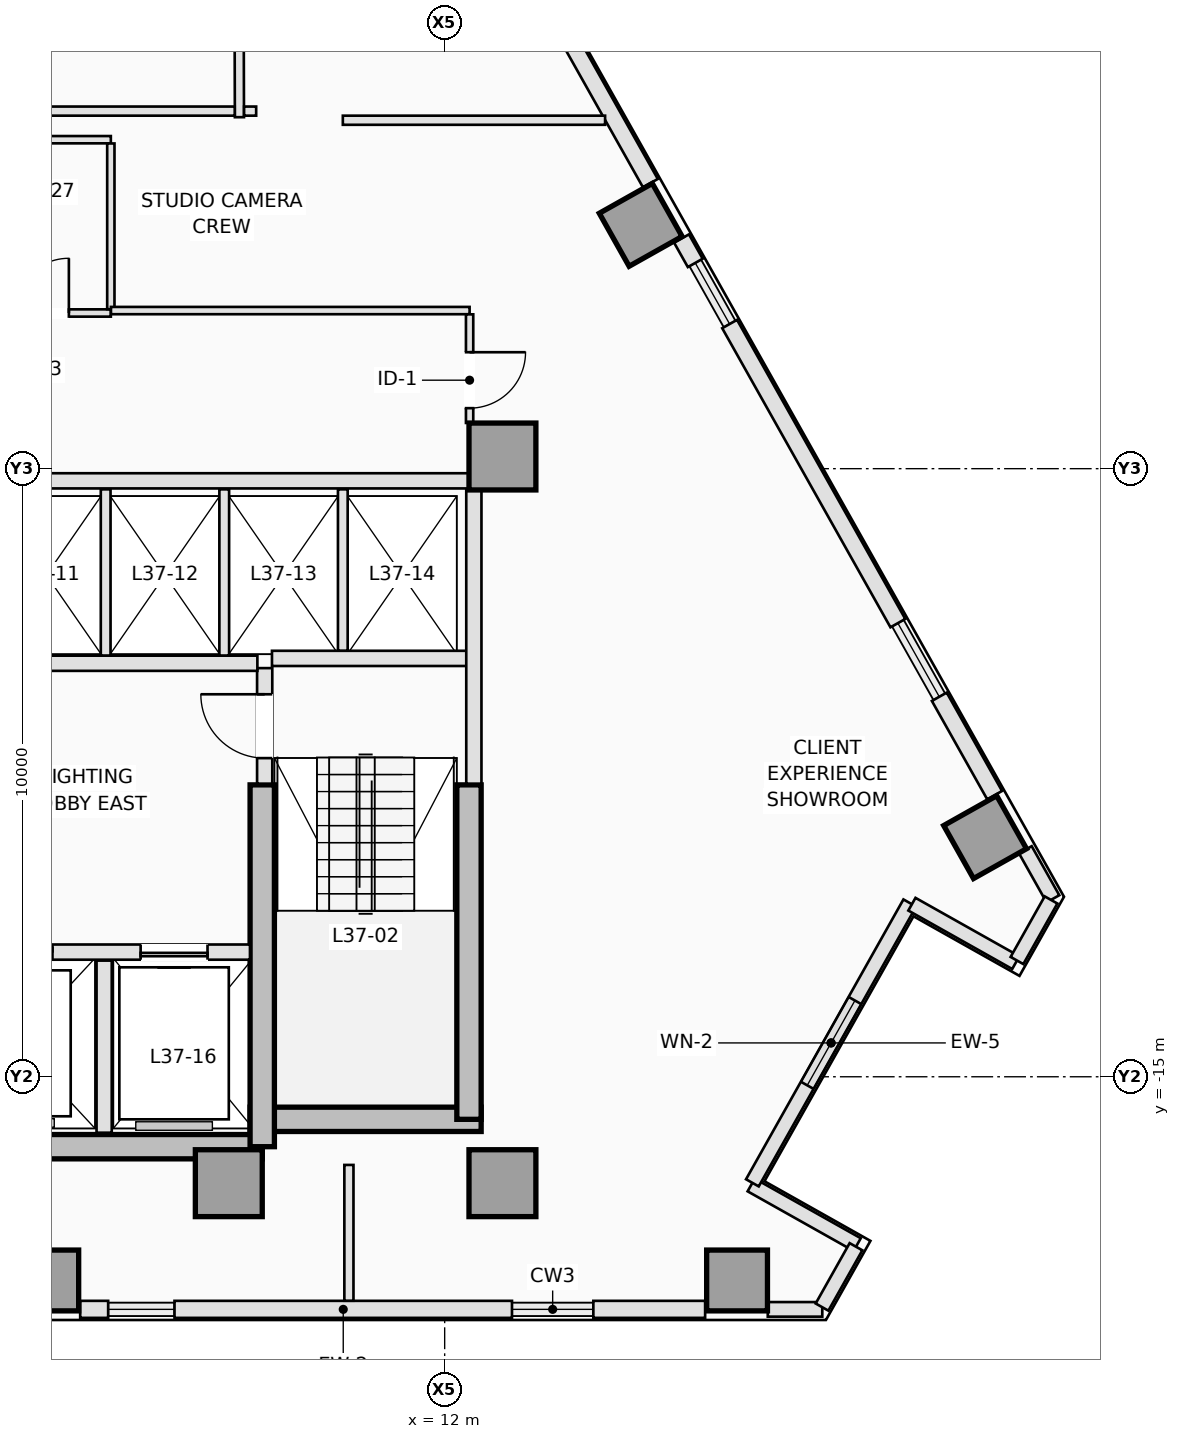
"""IFC4 building model, lengths in metres.
Left out: names, types, materials, properties, quantities, classifications, styles, units other than length and angle.
Written with IfcOpenShell. Run it as: python <this file> out.ifc"""

import sys

from ifc_helpers import new_model, si_unit, direction, frame, frame_2d, origin, origin_2d, place, context, subcontext, project, spatial, rectangle, extrude, element, fill, save


model = new_model("IFC4")
c1 = context("Model", 3, precision=1e-05, world=origin(), true_north=direction((0.0, 1.0)))
c2 = subcontext(c1, "Body", "Model", "MODEL_VIEW")
j1 = project(units=[si_unit("LENGTHUNIT", "METRE"), si_unit("PLANEANGLEUNIT", "RADIAN")], contexts=[c1])
p1 = place(None, origin())
s1 = spatial("IfcSite", under=j1, at=p1, CompositionType="ELEMENT")
p2 = place(p1, origin())
s2 = spatial("IfcBuilding", under=s1, at=p2, CompositionType="ELEMENT")
p3 = place(p2, frame((0.0, 0.0, 137.0)))
s3 = spatial("IfcBuildingStorey", under=s2, at=p3, CompositionType="ELEMENT", Elevation=137.0)
p4 = place(p3, frame((3.75, -16.15, 0.0), z_axis=(0.0, 0.0, 1.0), x_axis=(1.0, 0.0, 0.0)))
e1 = element("IfcWall", 1, at=p4, inside=s3, PredefinedType="SHEAR", context=c2, shape_type="SweptSolid", body=[
    extrude(rectangle(XDim=5.25, YDim=0.4, at=frame_2d((2.625, 0.0))), origin(), (0.0, 0.0, 1.0), 3.5),
])
p5 = place(p3, frame((8.8, -15.7, 0.0), z_axis=(0.0, 0.0, 1.0), x_axis=(1.0, 0.0, 0.0)))
e2 = element("IfcWall", 2, at=p5, inside=s3, PredefinedType="SHEAR", context=c2, shape_type="SweptSolid", body=[
    extrude(rectangle(XDim=3.8, YDim=0.4, at=frame_2d((1.9, 0.0))), origin(), (0.0, 0.0, 1.0), 3.5),
])
p6 = place(p3, frame((12.4, -15.7, 0.0), z_axis=(0.0, 0.0, 1.0), x_axis=(0.0, 1.0, 0.0)))
e3 = element("IfcWall", 3, at=p6, inside=s3, PredefinedType="SHEAR", context=c2, shape_type="SweptSolid", body=[
    extrude(rectangle(XDim=5.5, YDim=0.4, at=frame_2d((2.75, 0.0))), origin(), (0.0, 0.0, 1.0), 3.5),
])
p7 = place(p3, frame((9.0, -16.15, 0.0), z_axis=(0.0, 0.0, 1.0), x_axis=(0.0, 1.0, 0.0)))
e4 = element("IfcWall", 4, at=p7, inside=s3, PredefinedType="SHEAR", context=c2, shape_type="SweptSolid", body=[
    extrude(rectangle(XDim=5.95, YDim=0.4, at=frame_2d((2.975, 0.0))), origin(), (0.0, 0.0, 1.0), 3.5),
])
for number, where, z_axis, x_axis in (
    (5, (8.45, -16.75, 0.0), (0.0, 0.0, 1.0), (1.0, 0.0, 0.0)),
    (6, (12.95, -16.75, 0.0), (0.0, 0.0, 1.0), (1.0, 0.0, 0.0)),
    (7, (12.95, -4.8, 0.0), (0.0, 0.0, 1.0), (1.0, 0.0, 0.0)),
):
    element("IfcColumn", number, at=place(p3, frame(where, z_axis=z_axis, x_axis=x_axis)), inside=s3, PredefinedType="COLUMN", context=c2, shape_type="SweptSolid", body=[
        extrude(rectangle(XDim=1.1, YDim=1.1, at=origin_2d()), origin(), (0.0, 0.0, 1.0), 3.5),
    ])
for number, where, z_axis, x_axis in (
    (8, (5.481, -18.35, 0.0), (0.0, 0.0, 1.0), (0.0, 1.0, 0.0)),
    (9, (16.808, -18.35, 0.0), (0.0, 0.0, 1.0), (0.0, 1.0, 0.0)),
    (10, (20.888, -11.06, 0.0), (0.0, 0.0, 1.0), (0.872, 0.49, 0.0)),
    (11, (15.224, -0.991, 0.0), (0.0, 0.0, 1.0), (0.872, 0.49, 0.0)),
):
    element("IfcColumn", number, at=place(p3, frame(where, z_axis=z_axis, x_axis=x_axis)), inside=s3, PredefinedType="COLUMN", context=c2, shape_type="SweptSolid", body=[
        extrude(rectangle(XDim=1.0, YDim=1.0, at=origin_2d()), origin(), (0.0, 0.0, 1.0), 3.5),
    ])
p8 = place(p3, frame((18.21, -18.825, 0.0), z_axis=(0.0, 0.0, 1.0), x_axis=(-1.0, 0.0, 0.0)))
e12 = element("IfcWall", 12, at=p8, inside=s3, PredefinedType="STANDARD", context=c2, shape_type="SweptSolid", body=[
    extrude(rectangle(XDim=0.896, YDim=0.24, at=frame_2d((0.448, 0.0))), origin(), (0.0, 0.0, 1.0), 3.25),
])
p9 = place(p3, frame((16.283, -18.825, 0.0), z_axis=(0.0, 0.0, 1.0), x_axis=(-1.0, 0.0, 0.0)))
e13 = element("IfcWall", 13, at=p9, inside=s3, PredefinedType="STANDARD", context=c2, shape_type="SweptSolid", body=[
    extrude(rectangle(XDim=1.838, YDim=0.28, at=frame_2d((0.919, 0.0))), origin(), (0.0, 0.0, 1.0), 3.25),
])
p10 = place(p3, frame((13.107, -18.825, 0.0), z_axis=(0.0, 0.0, 1.0), x_axis=(-1.0, 0.0, 0.0)))
e14 = element("IfcWall", 14, at=p10, inside=s3, PredefinedType="STANDARD", context=c2, shape_type="SweptSolid", body=[
    extrude(rectangle(XDim=5.55, YDim=0.28, at=frame_2d((2.775, 0.0))), origin(), (0.0, 0.0, 1.0), 3.25),
])
p11 = place(p3, frame((6.466, -18.825, 0.0), z_axis=(0.0, 0.0, 1.0), x_axis=(-1.0, 0.0, 0.0)))
e15 = element("IfcWall", 15, at=p11, inside=s3, PredefinedType="STANDARD", context=c2, shape_type="SweptSolid", body=[
    extrude(rectangle(XDim=0.46, YDim=0.28, at=frame_2d((0.23, 0.0))), origin(), (0.0, 0.0, 1.0), 3.25),
])
p12 = place(p3, frame((21.549, -11.267, 0.0), z_axis=(0.0, 0.0, 1.0), x_axis=(0.490248718924, -0.871582579905, 0.0)))
e16 = element("IfcWall", 16, at=p12, inside=s3, PredefinedType="STANDARD", context=c2, shape_type="SweptSolid", body=[
    extrude(rectangle(XDim=0.926, YDim=0.24, at=frame_2d((0.463, 0.0))), origin(), (0.0, 0.0, 1.0), 3.25),
])
p13 = place(p3, frame((15.896, -1.215, 0.0), z_axis=(0.0, 0.0, 1.0), x_axis=(0.490009165718, -0.871717280724, 0.0)))
e17 = element("IfcWall", 17, at=p13, inside=s3, PredefinedType="STANDARD", context=c2, shape_type="SweptSolid", body=[
    extrude(rectangle(XDim=0.46, YDim=0.28, at=frame_2d((0.23, 0.0))), origin(), (0.0, 0.0, 1.0), 3.25),
])
p14 = place(p3, frame((16.686, -2.621, 0.0), z_axis=(0.0, 0.0, 1.0), x_axis=(0.490238645956, -0.871588245682, 0.0)))
e18 = element("IfcWall", 18, at=p14, inside=s3, PredefinedType="STANDARD", context=c2, shape_type="SweptSolid", body=[
    extrude(rectangle(XDim=5.643, YDim=0.28, at=frame_2d((2.822, 0.0))), origin(), (0.0, 0.0, 1.0), 3.25),
])
p15 = place(p3, frame((20.134, -8.751, 0.0), z_axis=(0.0, 0.0, 1.0), x_axis=(0.490248749158, -0.871582562899, 0.0)))
e19 = element("IfcWall", 19, at=p15, inside=s3, PredefinedType="STANDARD", context=c2, shape_type="SweptSolid", body=[
    extrude(rectangle(XDim=1.856, YDim=0.28, at=frame_2d((0.928, 0.0))), origin(), (0.0, 0.0, 1.0), 3.25),
])
p16 = place(p3, frame((13.238, 3.509, 0.0), z_axis=(0.0, 0.0, 1.0), x_axis=(0.490232095789, -0.871591929895, 0.0)))
e20 = element("IfcWall", 20, at=p16, inside=s3, PredefinedType="STANDARD", context=c2, shape_type="SweptSolid", body=[
    extrude(rectangle(XDim=4.375, YDim=0.28, at=frame_2d((2.188, 0.0))), origin(), (0.0, 0.0, 1.0), 3.25),
])
p17 = place(p3, frame((18.784, -17.76, 0.0), z_axis=(0.0, 0.0, 1.0), x_axis=(-0.871536415941, 0.49033078191, 0.0)))
e21 = element("IfcWall", 21, at=p17, inside=s3, PredefinedType="STANDARD", context=c2, shape_type="SweptSolid", body=[
    extrude(rectangle(XDim=2.0, YDim=0.24, at=frame_2d((1.0, 0.0))), origin(), (0.0, 0.0, 1.0), 3.25),
])
p18 = place(p3, frame((17.06, -16.744, 0.0), z_axis=(0.0, 0.0, 1.0), x_axis=(0.490276606961, 0.871566892824, 0.0)))
e22 = element("IfcWall", 22, at=p18, inside=s3, PredefinedType="STANDARD", context=c2, shape_type="SweptSolid", body=[
    extrude(rectangle(XDim=5.28, YDim=0.24, at=frame_2d((2.64, 0.0))), origin(), (0.0, 0.0, 1.0), 3.25),
])
p19 = place(p18, frame((1.84, 0.0, 0.9)))
e23 = element("IfcOpeningElement", 23, at=p19, cuts=e22, PredefinedType="OPENING", context=c2, shape_type="SweptSolid", body=[
    extrude(rectangle(XDim=1.6, YDim=2.1, at=frame_2d((0.8, 1.05))), frame((0.0, 0.13, 0.0), z_axis=(0.0, -1.0, 0.0), x_axis=(1.0, 0.0, 0.0)), (0.0, 0.0, 1.0), 0.26),
])
p20 = place(p3, frame((19.684, -12.162, 0.0), z_axis=(0.0, 0.0, 1.0), x_axis=(0.871512328312, -0.490373593906, 0.0)))
e24 = element("IfcWall", 24, at=p20, inside=s3, PredefinedType="STANDARD", context=c2, shape_type="SweptSolid", body=[
    extrude(rectangle(XDim=1.96, YDim=0.24, at=frame_2d((0.98, 0.0))), origin(), (0.0, 0.0, 1.0), 3.25),
])
p21 = place(p3, frame((21.412, -13.088, 0.0), z_axis=(0.0, 0.0, 1.0), x_axis=(0.4900989379, 0.871666811958, 0.0)))
e25 = element("IfcWall", 25, at=p21, inside=s3, PredefinedType="STANDARD", context=c2, shape_type="SweptSolid", body=[
    extrude(rectangle(XDim=1.143, YDim=0.24, at=frame_2d((0.571, 0.0))), origin(), (0.0, 0.0, 1.0), 3.25),
])
p22 = place(p3, frame((18.206, -18.788, 0.0), z_axis=(0.0, 0.0, 1.0), x_axis=(0.490403700594, 0.871495387506, 0.0)))
e26 = element("IfcWall", 26, at=p22, inside=s3, PredefinedType="STANDARD", context=c2, shape_type="SweptSolid", body=[
    extrude(rectangle(XDim=1.139, YDim=0.24, at=frame_2d((0.57, 0.0))), origin(), (0.0, 0.0, 1.0), 3.25),
])
p23 = place(p3, frame((9.04, -10.18, 0.0), z_axis=(0.0, 0.0, 1.0), x_axis=(0.0, 1.0, 0.0)))
e27 = element("IfcWall", 27, at=p23, inside=s3, PredefinedType="PARTITIONING", context=c2, shape_type="SweptSolid", body=[
    extrude(rectangle(XDim=1.9, YDim=0.25, at=frame_2d((0.95, 0.0))), origin(), (0.0, 0.0, 1.0), 3.25),
])
p24 = place(p23, frame((0.42, 0.0, 0.0)))
e28 = element("IfcOpeningElement", 28, at=p24, cuts=e27, PredefinedType="OPENING", context=c2, shape_type="SweptSolid", body=[
    extrude(rectangle(XDim=1.05, YDim=2.15, at=frame_2d((0.525, 1.075))), frame((0.0, 0.135, 0.0), z_axis=(0.0, -1.0, 0.0), x_axis=(1.0, 0.0, 0.0)), (0.0, 0.0, 1.0), 0.27),
])
p25 = place(p3, frame((9.16, -8.12, 0.0), z_axis=(0.0, 0.0, 1.0), x_axis=(1.0, 0.0, 0.0)))
e29 = element("IfcWall", 29, at=p25, inside=s3, PredefinedType="PARTITIONING", context=c2, shape_type="SweptSolid", body=[
    extrude(rectangle(XDim=3.22, YDim=0.25, at=frame_2d((1.61, 0.0))), origin(), (0.0, 0.0, 1.0), 3.25),
])
p26 = place(p3, frame((12.48, -10.18, 0.0), z_axis=(0.0, 0.0, 1.0), x_axis=(0.0, 1.0, 0.0)))
e30 = element("IfcWall", 30, at=p26, inside=s3, PredefinedType="PARTITIONING", context=c2, shape_type="SweptSolid", body=[
    extrude(rectangle(XDim=4.828, YDim=0.25, at=frame_2d((2.414, 0.0))), origin(), (0.0, 0.0, 1.0), 3.25),
])
p27 = place(p3, frame((3.68, -12.95, 0.0), z_axis=(0.0, 0.0, 1.0), x_axis=(1.0, 0.0, 0.0)))
e31 = element("IfcWall", 31, at=p27, inside=s3, PredefinedType="PARTITIONING", context=c2, shape_type="SweptSolid", body=[
    extrude(rectangle(XDim=5.118, YDim=0.25, at=frame_2d((2.559, 0.0))), origin(), (0.0, 0.0, 1.0), 3.25),
])
p28 = place(p27, frame((3.32, 0.0, 0.0)))
e32 = element("IfcOpeningElement", 32, at=p28, cuts=e31, PredefinedType="OPENING", context=c2, shape_type="SweptSolid", body=[
    extrude(rectangle(XDim=1.1, YDim=2.15, at=frame_2d((0.55, 1.075))), frame((0.0, 0.135, 0.0), z_axis=(0.0, -1.0, 0.0), x_axis=(1.0, 0.0, 0.0)), (0.0, 0.0, 1.0), 0.27),
])
p29 = place(p27, frame((0.67, 0.0, 0.0)))
e33 = element("IfcOpeningElement", 33, at=p29, cuts=e31, PredefinedType="OPENING", context=c2, shape_type="SweptSolid", body=[
    extrude(rectangle(XDim=1.2, YDim=2.15, at=frame_2d((0.6, 1.075))), frame((0.0, 0.135, 0.0), z_axis=(0.0, -1.0, 0.0), x_axis=(1.0, 0.0, 0.0)), (0.0, 0.0, 1.0), 0.27),
])
p30 = place(p3, frame((6.4, -15.92, 0.0), z_axis=(0.0, 0.0, 1.0), x_axis=(0.0, 1.0, 0.0)))
e34 = element("IfcWall", 34, at=p30, inside=s3, PredefinedType="PARTITIONING", context=c2, shape_type="SweptSolid", body=[
    extrude(rectangle(XDim=2.83, YDim=0.25, at=frame_2d((1.415, 0.0))), origin(), (0.0, 0.0, 1.0), 3.25),
])
p31 = place(p3, frame((3.68, -8.2, 0.0), z_axis=(0.0, 0.0, 1.0), x_axis=(1.0, 0.0, 0.0)))
e35 = element("IfcWall", 35, at=p31, inside=s3, PredefinedType="PARTITIONING", context=c2, shape_type="SweptSolid", body=[
    extrude(rectangle(XDim=5.24, YDim=0.25, at=frame_2d((2.62, 0.0))), origin(), (0.0, 0.0, 1.0), 3.25),
])
p32 = place(p3, frame((4.302, -5.2, 0.0), z_axis=(0.0, 0.0, 1.0), x_axis=(1.0, 0.0, 0.0)))
e36 = element("IfcWall", 36, at=p32, inside=s3, PredefinedType="PARTITIONING", context=c2, shape_type="SweptSolid", body=[
    extrude(rectangle(XDim=8.096, YDim=0.25, at=frame_2d((4.048, 0.0))), origin(), (0.0, 0.0, 1.0), 3.25),
])
for number, where, z_axis, x_axis in (
    (37, (6.425, -8.073, 0.0), (0.0, 0.0, 1.0), (0.0, 1.0, 0.0)),
    (38, (8.375, -8.073, 0.0), (0.0, 0.0, 1.0), (0.0, 1.0, 0.0)),
):
    element("IfcWall", number, at=place(p3, frame(where, z_axis=z_axis, x_axis=x_axis)), inside=s3, PredefinedType="PARTITIONING", context=c2, shape_type="SweptSolid", body=[
        extrude(rectangle(XDim=2.733, YDim=0.16, at=frame_2d((1.366, 0.0))), origin(), (0.0, 0.0, 1.0), 3.25),
    ])
p33 = place(p3, frame((10.325, -7.993, 0.0), z_axis=(0.0, 0.0, 1.0), x_axis=(0.0, 1.0, 0.0)))
e39 = element("IfcWall", 39, at=p33, inside=s3, PredefinedType="PARTITIONING", context=c2, shape_type="SweptSolid", body=[
    extrude(rectangle(XDim=2.653, YDim=0.16, at=frame_2d((1.326, 0.0))), origin(), (0.0, 0.0, 1.0), 3.25),
])
p34 = place(p3, frame((1.94, -2.44, 0.0), z_axis=(0.0, 0.0, 1.0), x_axis=(1.0, 0.0, 0.0)))
e40 = element("IfcWall", 40, at=p34, inside=s3, PredefinedType="PARTITIONING", context=c2, shape_type="SweptSolid", body=[
    extrude(rectangle(XDim=4.57, YDim=0.12, at=frame_2d((2.285, 0.0))), origin(), (0.0, 0.0, 1.0), 2.891),
])
p35 = place(p34, frame((0.7, 0.0, 0.0)))
e41 = element("IfcOpeningElement", 41, at=p35, cuts=e40, PredefinedType="OPENING", context=c2, shape_type="SweptSolid", body=[
    extrude(rectangle(XDim=0.9, YDim=2.12, at=frame_2d((0.45, 1.06))), frame((0.0, 0.07, 0.0), z_axis=(0.0, -1.0, 0.0), x_axis=(1.0, 0.0, 0.0)), (0.0, 0.0, 1.0), 0.14),
])
p36 = place(p34, frame((2.98, 0.0, 0.0)))
e42 = element("IfcOpeningElement", 42, at=p36, cuts=e40, PredefinedType="OPENING", context=c2, shape_type="SweptSolid", body=[
    extrude(rectangle(XDim=0.9, YDim=2.12, at=frame_2d((0.45, 1.06))), frame((0.0, 0.07, 0.0), z_axis=(0.0, -1.0, 0.0), x_axis=(1.0, 0.0, 0.0)), (0.0, 0.0, 1.0), 0.14),
])
p37 = place(p3, frame((1.94, 0.41, 0.0), z_axis=(0.0, 0.0, 1.0), x_axis=(1.0, 0.0, 0.0)))
e43 = element("IfcWall", 43, at=p37, inside=s3, PredefinedType="PARTITIONING", context=c2, shape_type="SweptSolid", body=[
    extrude(rectangle(XDim=4.57, YDim=0.12, at=frame_2d((2.285, 0.0))), origin(), (0.0, 0.0, 1.0), 3.25),
])
p38 = place(p3, frame((6.51, -2.378, 0.0), z_axis=(0.0, 0.0, 1.0), x_axis=(0.0, 1.0, 0.0)))
e44 = element("IfcWall", 44, at=p38, inside=s3, PredefinedType="PARTITIONING", context=c2, shape_type="SweptSolid", body=[
    extrude(rectangle(XDim=2.726, YDim=0.12, at=frame_2d((1.363, 0.0))), origin(), (0.0, 0.0, 1.0), 3.25),
])
p39 = place(p3, frame((6.512, -2.4, 0.0), z_axis=(0.0, 0.0, 1.0), x_axis=(1.0, 0.0, 0.0)))
e45 = element("IfcWall", 45, at=p39, inside=s3, PredefinedType="PARTITIONING", context=c2, shape_type="SweptSolid", body=[
    extrude(rectangle(XDim=5.898, YDim=0.12, at=frame_2d((2.949, 0.0))), origin(), (0.0, 0.0, 1.0), 3.25),
])
p40 = place(p3, frame((12.41, -2.462, 0.0), z_axis=(0.0, 0.0, 1.0), x_axis=(0.0, -1.0, 0.0)))
e46 = element("IfcWall", 46, at=p40, inside=s3, PredefinedType="PARTITIONING", context=c2, shape_type="SweptSolid", body=[
    extrude(rectangle(XDim=1.786, YDim=0.12, at=frame_2d((0.893, 0.0))), origin(), (0.0, 0.0, 1.0), 3.25),
])
p41 = place(p40, frame((0.623, 0.0, 0.0)))
e47 = element("IfcOpeningElement", 47, at=p41, cuts=e46, PredefinedType="OPENING", context=c2, shape_type="SweptSolid", body=[
    extrude(rectangle(XDim=0.92, YDim=2.12, at=frame_2d((0.46, 1.06))), frame((0.0, 0.07, 0.0), z_axis=(0.0, -1.0, 0.0), x_axis=(1.0, 0.0, 0.0)), (0.0, 0.0, 1.0), 0.14),
])
p42 = place(p3, frame((8.625, 0.78, 0.0), z_axis=(0.0, 0.0, 1.0), x_axis=(-0.002664604467, 0.999996449935, 0.0)))
e48 = element("IfcWall", 48, at=p42, inside=s3, PredefinedType="PARTITIONING", context=c2, shape_type="SweptSolid", body=[
    extrude(rectangle(XDim=4.123, YDim=0.15, at=frame_2d((2.062, 0.0))), origin(), (0.0, 0.0, 1.0), 3.25),
])
p43 = place(p3, frame((14.638, 0.73, 0.0), z_axis=(0.0, 0.0, 1.0), x_axis=(-1.0, 0.0, 0.0)))
e49 = element("IfcWall", 49, at=p43, inside=s3, PredefinedType="PARTITIONING", context=c2, shape_type="SweptSolid", body=[
    extrude(rectangle(XDim=4.313, YDim=0.15, at=frame_2d((2.156, 0.0))), origin(), (0.0, 0.0, 1.0), 3.25),
])
p44 = place(p3, frame((8.9, 0.88, 0.0), z_axis=(0.0, 0.0, 1.0), x_axis=(-1.0, 0.0, 0.0)))
e50 = element("IfcWall", 50, at=p44, inside=s3, PredefinedType="PARTITIONING", context=c2, shape_type="SweptSolid", body=[
    extrude(rectangle(XDim=0.198, YDim=0.15, at=frame_2d((0.099, 0.0))), origin(), (0.0, 0.0, 1.0), 3.25),
])
p45 = place(p3, frame((8.548, 0.88, 0.0), z_axis=(0.0, 0.0, 1.0), x_axis=(-1.0, 0.0, 0.0)))
e51 = element("IfcWall", 51, at=p45, inside=s3, PredefinedType="PARTITIONING", context=c2, shape_type="SweptSolid", body=[
    extrude(rectangle(XDim=7.368, YDim=0.15, at=frame_2d((3.684, 0.0))), origin(), (0.0, 0.0, 1.0), 3.25),
])
p46 = place(p3, frame((10.425, -18.683, 0.0), z_axis=(0.0, 0.0, 1.0), x_axis=(0.0, 1.0, 0.0)))
e52 = element("IfcWall", 52, at=p46, inside=s3, PredefinedType="PARTITIONING", context=c2, shape_type="SweptSolid", body=[
    extrude(rectangle(XDim=2.233, YDim=0.15, at=frame_2d((1.117, 0.0))), origin(), (0.0, 0.0, 1.0), 3.25),
])
p47 = place(p19, origin())
e53 = element("IfcWindow", 53, at=p47, inside=s3, PartitioningType="SINGLE_PANEL", PredefinedType="WINDOW", context=c2, shape_type="SweptSolid", body=[
    extrude(rectangle(XDim=1.6, YDim=2.1, at=frame_2d((0.8, 1.05))), frame((0.0, 0.03, 0.0), z_axis=(0.0, -1.0, 0.0), x_axis=(1.0, 0.0, 0.0)), (0.0, 0.0, 1.0), 0.06),
])
fill(e23, e53)
p48 = place(p28, origin())
e54 = element("IfcDoor", 54, at=p48, inside=s3, OperationType="SLIDING_TO_RIGHT", PredefinedType="DOOR", context=c2, shape_type="SweptSolid", body=[
    extrude(rectangle(XDim=1.1, YDim=2.15, at=frame_2d((0.55, 1.075))), frame((0.0, 0.025, 0.0), z_axis=(0.0, -1.0, 0.0), x_axis=(1.0, 0.0, 0.0)), (0.0, 0.0, 1.0), 0.05),
])
fill(e32, e54)
p49 = place(p24, origin())
e55 = element("IfcDoor", 55, at=p49, inside=s3, OperationType="SINGLE_SWING_RIGHT", PredefinedType="DOOR", context=c2, shape_type="SweptSolid", body=[
    extrude(rectangle(XDim=1.05, YDim=2.15, at=frame_2d((0.525, 1.075))), frame((0.0, 0.025, 0.0), z_axis=(0.0, -1.0, 0.0), x_axis=(1.0, 0.0, 0.0)), (0.0, 0.0, 1.0), 0.05),
])
fill(e28, e55)
p50 = place(p36, origin())
e56 = element("IfcDoor", 56, at=p50, inside=s3, OperationType="SINGLE_SWING_RIGHT", PredefinedType="DOOR", context=c2, shape_type="SweptSolid", body=[
    extrude(rectangle(XDim=0.9, YDim=2.12, at=frame_2d((0.45, 1.06))), frame((0.0, 0.025, 0.0), z_axis=(0.0, -1.0, 0.0), x_axis=(1.0, 0.0, 0.0)), (0.0, 0.0, 1.0), 0.05),
])
fill(e42, e56)
p51 = place(p41, origin())
e57 = element("IfcDoor", 57, at=p51, inside=s3, OperationType="SINGLE_SWING_LEFT", PredefinedType="DOOR", context=c2, shape_type="SweptSolid", body=[
    extrude(rectangle(XDim=0.92, YDim=2.12, at=frame_2d((0.46, 1.06))), frame((0.0, 0.025, 0.0), z_axis=(0.0, -1.0, 0.0), x_axis=(1.0, 0.0, 0.0)), (0.0, 0.0, 1.0), 0.05),
])
fill(e47, e57)
save(model, sys.argv[1])
